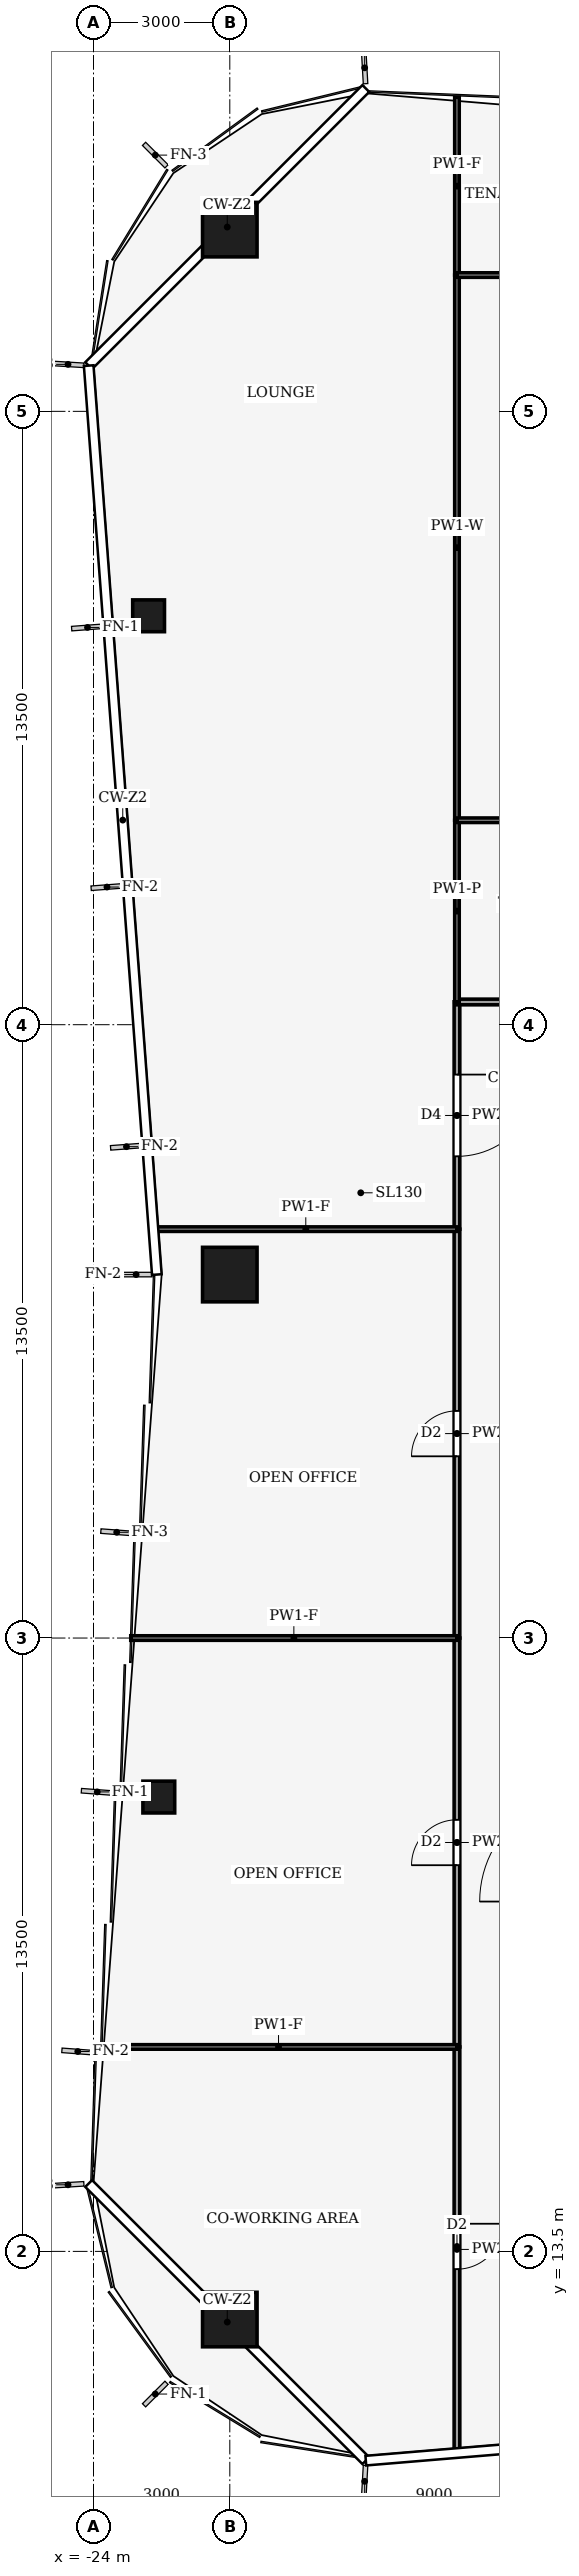
"""IFC4 building model, lengths in metres.
Left out: names, types, materials, properties, quantities, classifications, styles, units other than length and angle.
Written with IfcOpenShell. Run it as: python <this file> out.ifc"""

import sys

from ifc_helpers import new_model, si_unit, direction, frame, frame_2d, origin, origin_2d, place, context, subcontext, project, spatial, rectangle, hollow_rectangle, extrude, element, fill, save


model = new_model("IFC4")
c1 = context("Model", 3, precision=1e-05, world=origin(), true_north=direction((0.0, 1.0)))
c2 = subcontext(c1, "Body", "Model", "MODEL_VIEW")
j1 = project(units=[si_unit("LENGTHUNIT", "METRE"), si_unit("PLANEANGLEUNIT", "RADIAN")], contexts=[c1])
p1 = place(None, origin())
s1 = spatial("IfcSite", under=j1, at=p1, CompositionType="ELEMENT")
p2 = place(p1, origin())
s2 = spatial("IfcBuilding", under=s1, at=p2, CompositionType="ELEMENT")
p3 = place(p2, frame((0.0, 0.0, 150.0)))
s3 = spatial("IfcBuildingStorey", under=s2, at=p3, CompositionType="ELEMENT", Elevation=150.0)
for number, where, z_axis, x_axis in (
    (1, (-21.0, 58.0, 0.0), (0.0, 0.0, 1.0), (1.0, 0.0, 0.0)),
    (2, (-21.0, 12.0, 0.0), (0.0, 0.0, 1.0), (1.0, 0.0, 0.0)),
    (3, (-21.0, 35.0, 0.0), (0.0, 0.0, 1.0), (1.0, 0.0, 0.0)),
):
    element("IfcColumn", number, at=place(p3, frame(where, z_axis=z_axis, x_axis=x_axis)), inside=s3, PredefinedType="COLUMN", context=c2, shape_type="SweptSolid", body=[
        extrude(hollow_rectangle(XDim=1.2, YDim=1.2, WallThickness=0.07, at=origin_2d()), origin(), (0.0, 0.0, 1.0), 4.0),
    ])
for number, where, z_axis, x_axis in (
    (4, (-22.562, 23.5, 0.0), (0.0, 0.0, 1.0), (1.0, 0.0, 0.0)),
    (5, (-22.788, 49.5, 0.0), (0.0, 0.0, 1.0), (1.0, 0.0, 0.0)),
):
    element("IfcColumn", number, at=place(p3, frame(where, z_axis=z_axis, x_axis=x_axis)), inside=s3, PredefinedType="COLUMN", context=c2, shape_type="SweptSolid", body=[
        extrude(hollow_rectangle(XDim=0.7, YDim=0.7, WallThickness=0.03, at=origin_2d()), origin(), (0.0, 0.0, 1.0), 4.0),
    ])
p4 = place(p3, frame((-16.0, 18.0, 0.0), z_axis=(0.0, 0.0, 1.0), x_axis=(0.0, -1.0, 0.0)))
e6 = element("IfcWall", 6, at=p4, inside=s3, PredefinedType="PARTITIONING", context=c2, shape_type="SweptSolid", body=[
    extrude(rectangle(XDim=8.913, YDim=0.125, at=frame_2d((4.457, 0.0))), origin(), (0.0, 0.0, 1.0), 3.04),
])
p5 = place(p4, frame((3.892, 0.0, 0.0)))
e7 = element("IfcOpeningElement", 7, at=p5, cuts=e6, PredefinedType="OPENING", context=c2, shape_type="SweptSolid", body=[
    extrude(rectangle(XDim=1.0, YDim=2.1, at=frame_2d((0.5, 1.05))), frame((0.0, 0.073, 0.0), z_axis=(0.0, -1.0, 0.0), x_axis=(1.0, 0.0, 0.0)), (0.0, 0.0, 1.0), 0.145),
])
p6 = place(p3, frame((-16.0, 18.0, 0.0), z_axis=(0.0, 0.0, 1.0), x_axis=(0.0, 1.0, 0.0)))
e8 = element("IfcWall", 8, at=p6, inside=s3, PredefinedType="PARTITIONING", context=c2, shape_type="SweptSolid", body=[
    extrude(rectangle(XDim=9.0, YDim=0.125, at=frame_2d((4.5, 0.0))), origin(), (0.0, 0.0, 1.0), 3.48),
])
p7 = place(p6, frame((4.0, 0.0, 0.0)))
e9 = element("IfcOpeningElement", 9, at=p7, cuts=e8, PredefinedType="OPENING", context=c2, shape_type="SweptSolid", body=[
    extrude(rectangle(XDim=1.0, YDim=2.1, at=frame_2d((0.5, 1.05))), frame((0.0, 0.073, 0.0), z_axis=(0.0, -1.0, 0.0), x_axis=(1.0, 0.0, 0.0)), (0.0, 0.0, 1.0), 0.145),
])
p8 = place(p3, frame((-16.0, 27.0, 0.0), z_axis=(0.0, 0.0, 1.0), x_axis=(0.0, 1.0, 0.0)))
e10 = element("IfcWall", 10, at=p8, inside=s3, PredefinedType="PARTITIONING", context=c2, shape_type="SweptSolid", body=[
    extrude(rectangle(XDim=9.0, YDim=0.125, at=frame_2d((4.5, 0.0))), origin(), (0.0, 0.0, 1.0), 3.48),
])
p9 = place(p8, frame((4.0, 0.0, 0.0)))
e11 = element("IfcOpeningElement", 11, at=p9, cuts=e10, PredefinedType="OPENING", context=c2, shape_type="SweptSolid", body=[
    extrude(rectangle(XDim=1.0, YDim=2.1, at=frame_2d((0.5, 1.05))), frame((0.0, 0.073, 0.0), z_axis=(0.0, -1.0, 0.0), x_axis=(1.0, 0.0, 0.0)), (0.0, 0.0, 1.0), 0.145),
])
p10 = place(p3, frame((-16.0, 41.004, 0.0), z_axis=(0.0, 0.0, 1.0), x_axis=(0.0, -1.0, 0.0)))
e12 = element("IfcWall", 12, at=p10, inside=s3, PredefinedType="PARTITIONING", context=c2, shape_type="SweptSolid", body=[
    extrude(rectangle(XDim=5.004, YDim=0.125, at=frame_2d((2.502, 0.0))), origin(), (0.0, 0.0, 1.0), 3.14),
])
p11 = place(p10, frame((1.602, 0.0, 0.0)))
e13 = element("IfcOpeningElement", 13, at=p11, cuts=e12, PredefinedType="OPENING", context=c2, shape_type="SweptSolid", body=[
    extrude(rectangle(XDim=1.8, YDim=2.1, at=frame_2d((0.9, 1.05))), frame((0.0, 0.073, 0.0), z_axis=(0.0, -1.0, 0.0), x_axis=(1.0, 0.0, 0.0)), (0.0, 0.0, 1.0), 0.145),
])
p12 = place(p3, frame((-16.0, 41.0, 0.0), z_axis=(0.0, 0.0, 1.0), x_axis=(1.0, 0.0, 0.0)))
e14 = element("IfcWall", 14, at=p12, inside=s3, PredefinedType="PARTITIONING", context=c2, shape_type="SweptSolid", body=[
    extrude(rectangle(XDim=4.0, YDim=0.125, at=frame_2d((2.0, 0.0))), origin(), (0.0, 0.0, 1.0), 3.44),
])
p13 = place(p12, frame((1.5, 0.0, 0.0)))
e15 = element("IfcOpeningElement", 15, at=p13, cuts=e14, PredefinedType="OPENING", context=c2, shape_type="SweptSolid", body=[
    extrude(rectangle(XDim=1.0, YDim=2.1, at=frame_2d((0.5, 1.05))), frame((0.0, 0.073, 0.0), z_axis=(0.0, -1.0, 0.0), x_axis=(1.0, 0.0, 0.0)), (0.0, 0.0, 1.0), 0.145),
])
p14 = place(p3, frame((-16.0, 18.0, 0.0), z_axis=(0.0, 0.0, 1.0), x_axis=(-1.0, 0.0, 0.0)))
e16 = element("IfcWall", 16, at=p14, inside=s3, PredefinedType="PARTITIONING", context=c2, shape_type="SweptSolid", body=[
    extrude(rectangle(XDim=7.855, YDim=0.1, at=frame_2d((3.927, 0.0))), origin(), (0.0, 0.0, 1.0), 3.04),
])
p15 = place(p3, frame((-16.0, 27.0, 0.0), z_axis=(0.0, 0.0, 1.0), x_axis=(-1.0, 0.0, 0.0)))
e17 = element("IfcWall", 17, at=p15, inside=s3, PredefinedType="PARTITIONING", context=c2, shape_type="SweptSolid", body=[
    extrude(rectangle(XDim=7.18, YDim=0.1, at=frame_2d((3.59, 0.0))), origin(), (0.0, 0.0, 1.0), 3.04),
])
p16 = place(p3, frame((-16.0, 36.0, 0.0), z_axis=(0.0, 0.0, 1.0), x_axis=(-1.0, 0.0, 0.0)))
e18 = element("IfcWall", 18, at=p16, inside=s3, PredefinedType="PARTITIONING", context=c2, shape_type="SweptSolid", body=[
    extrude(rectangle(XDim=6.655, YDim=0.1, at=frame_2d((3.328, 0.0))), origin(), (0.0, 0.0, 1.0), 3.04),
])
p17 = place(p3, frame((-16.0, 41.0, 0.0), z_axis=(0.0, 0.0, 1.0), x_axis=(0.0, 1.0, 0.0)))
e19 = element("IfcWall", 19, at=p17, inside=s3, PredefinedType="PARTITIONING", context=c2, shape_type="SweptSolid", body=[
    extrude(rectangle(XDim=4.0, YDim=0.1, at=frame_2d((2.0, 0.0))), origin(), (0.0, 0.0, 1.0), 3.44),
])
p18 = place(p3, frame((-16.0, 45.0, 0.0), z_axis=(0.0, 0.0, 1.0), x_axis=(0.0, 1.0, 0.0)))
e20 = element("IfcWall", 20, at=p18, inside=s3, PredefinedType="PARTITIONING", context=c2, shape_type="SweptSolid", body=[
    extrude(rectangle(XDim=12.0, YDim=0.1, at=frame_2d((6.0, 0.0))), origin(), (0.0, 0.0, 1.0), 3.24),
])
p19 = place(p3, frame((-16.0, 57.0, 0.0), z_axis=(0.0, 0.0, 1.0), x_axis=(0.0, 1.0, 0.0)))
e21 = element("IfcWall", 21, at=p19, inside=s3, PredefinedType="PARTITIONING", context=c2, shape_type="SweptSolid", body=[
    extrude(rectangle(XDim=3.913, YDim=0.1, at=frame_2d((1.957, 0.0))), origin(), (0.0, 0.0, 1.0), 3.04),
])
p20 = place(p3, frame((-11.996, 45.0, 0.0), z_axis=(0.0, 0.0, 1.0), x_axis=(-1.0, 0.0, 0.0)))
e22 = element("IfcWall", 22, at=p20, inside=s3, PredefinedType="PARTITIONING", context=c2, shape_type="SweptSolid", body=[
    extrude(rectangle(XDim=4.004, YDim=0.1, at=frame_2d((2.002, 0.0))), origin(), (0.0, 0.0, 1.0), 3.87),
])
p21 = place(p3, frame((-16.0, 57.0, 0.0), z_axis=(0.0, 0.0, 1.0), x_axis=(1.0, 0.0, 0.0)))
e23 = element("IfcWall", 23, at=p21, inside=s3, PredefinedType="PARTITIONING", context=c2, shape_type="SweptSolid", body=[
    extrude(rectangle(XDim=13.0, YDim=0.1, at=frame_2d((6.5, 0.0))), origin(), (0.0, 0.0, 1.0), 3.44),
])
p22 = place(p21, frame((6.8, 0.0, 0.0)))
e24 = element("IfcOpeningElement", 24, at=p22, cuts=e23, PredefinedType="OPENING", context=c2, shape_type="SweptSolid", body=[
    extrude(rectangle(XDim=1.0, YDim=2.1, at=frame_2d((0.5, 1.05))), frame((0.0, 0.06, 0.0), z_axis=(0.0, -1.0, 0.0), x_axis=(1.0, 0.0, 0.0)), (0.0, 0.0, 1.0), 0.12),
])
p23 = place(p5, origin())
e25 = element("IfcDoor", 25, at=p23, inside=s3, OperationType="SINGLE_SWING_LEFT", PredefinedType="DOOR", context=c2, shape_type="SweptSolid", body=[
    extrude(rectangle(XDim=1.0, YDim=2.1, at=frame_2d((0.5, 1.05))), frame((0.0, 0.025, 0.0), z_axis=(0.0, -1.0, 0.0), x_axis=(1.0, 0.0, 0.0)), (0.0, 0.0, 1.0), 0.05),
])
fill(e7, e25)
p24 = place(p7, origin())
e26 = element("IfcDoor", 26, at=p24, inside=s3, OperationType="SINGLE_SWING_RIGHT", PredefinedType="DOOR", context=c2, shape_type="SweptSolid", body=[
    extrude(rectangle(XDim=1.0, YDim=2.1, at=frame_2d((0.5, 1.05))), frame((0.0, 0.025, 0.0), z_axis=(0.0, -1.0, 0.0), x_axis=(1.0, 0.0, 0.0)), (0.0, 0.0, 1.0), 0.05),
])
fill(e9, e26)
p25 = place(p9, origin())
e27 = element("IfcDoor", 27, at=p25, inside=s3, OperationType="SINGLE_SWING_LEFT", PredefinedType="DOOR", context=c2, shape_type="SweptSolid", body=[
    extrude(rectangle(XDim=1.0, YDim=2.1, at=frame_2d((0.5, 1.05))), frame((0.0, 0.025, 0.0), z_axis=(0.0, -1.0, 0.0), x_axis=(1.0, 0.0, 0.0)), (0.0, 0.0, 1.0), 0.05),
])
fill(e11, e27)
p26 = place(p11, origin())
e28 = element("IfcDoor", 28, at=p26, inside=s3, OperationType="DOUBLE_DOOR_SINGLE_SWING", PredefinedType="DOOR", context=c2, shape_type="SweptSolid", body=[
    extrude(rectangle(XDim=1.8, YDim=2.1, at=frame_2d((0.9, 1.05))), frame((0.0, 0.025, 0.0), z_axis=(0.0, -1.0, 0.0), x_axis=(1.0, 0.0, 0.0)), (0.0, 0.0, 1.0), 0.05),
])
fill(e13, e28)
save(model, sys.argv[1])
